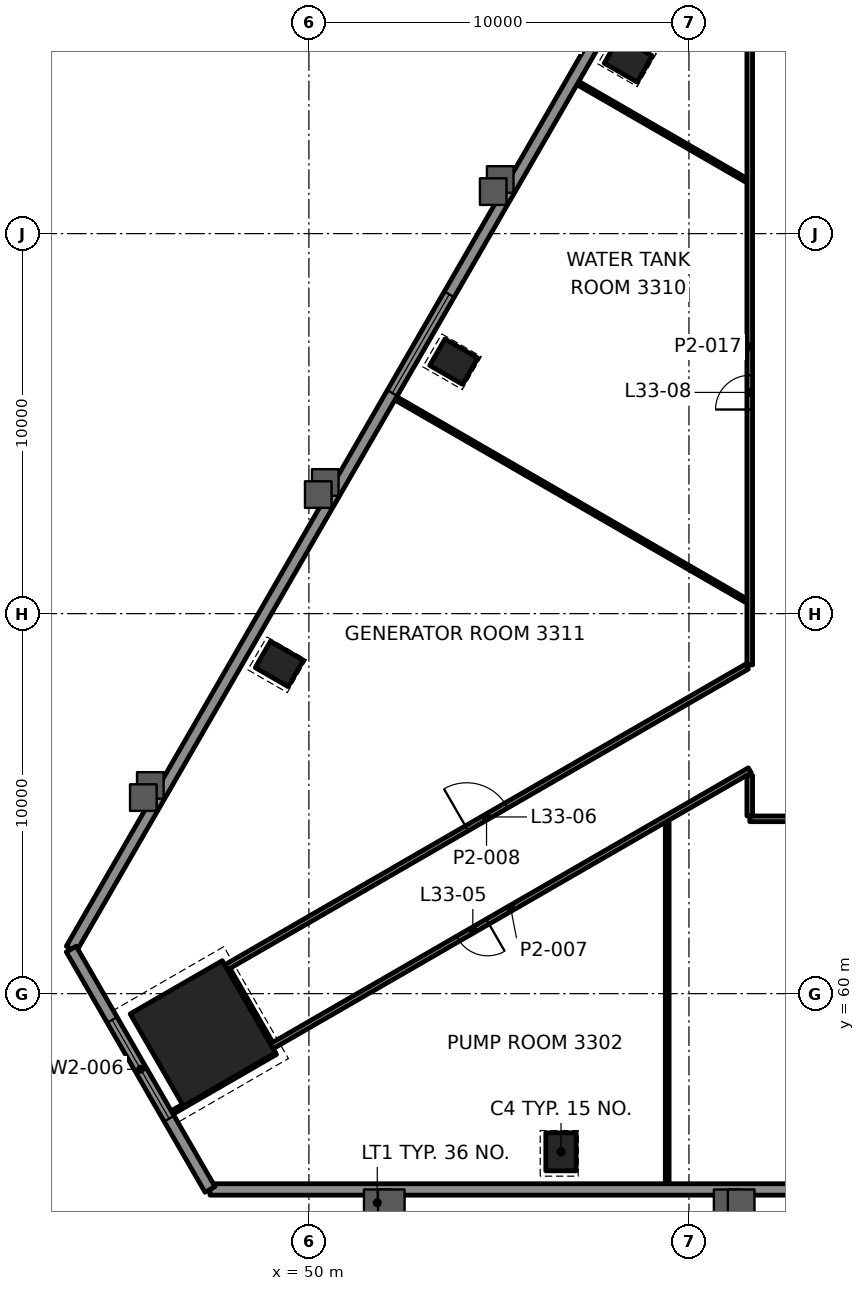
"""IFC4 building model, lengths in metres.
Left out: names, types, materials, properties, quantities, classifications, styles, units other than length and angle.
Written with IfcOpenShell. Run it as: python <this file> out.ifc"""

import sys

from ifc_helpers import new_model, si_unit, direction, frame, frame_2d, origin, origin_2d, place, context, subcontext, project, spatial, rectangle, hollow_rectangle, extrude, element, fill, save


model = new_model("IFC4")
c1 = context("Model", 3, precision=1e-05, world=origin(), true_north=direction((0.0, 1.0)))
c2 = subcontext(c1, "Body", "Model", "MODEL_VIEW")
j1 = project(units=[si_unit("LENGTHUNIT", "METRE"), si_unit("PLANEANGLEUNIT", "RADIAN")], contexts=[c1])
p1 = place(None, origin())
s1 = spatial("IfcSite", under=j1, at=p1, CompositionType="ELEMENT")
p2 = place(p1, origin())
s2 = spatial("IfcBuilding", under=s1, at=p2, CompositionType="ELEMENT")
p3 = place(p2, frame((0.0, 0.0, 146.8)))
s3 = spatial("IfcBuildingStorey", under=s2, at=p3, CompositionType="ELEMENT", Elevation=146.8)
p4 = place(p3, frame((47.209, 58.955, 0.0), z_axis=(0.0, 0.0, 1.0), x_axis=(0.5, -0.866025403784, 0.0)))
e1 = element("IfcColumn", 1, at=p4, inside=s3, PredefinedType="COLUMN", context=c2, shape_type="SweptSolid", body=[
    extrude(rectangle(XDim=2.8, YDim=2.8, at=origin_2d()), origin(), (0.0, 0.0, 1.0), 4.5),
])
for number, where, z_axis, x_axis in (
    (2, (56.633, 55.837, -0.0), (0.0, 0.0, 1.0), (1.0, 0.0, 0.0)),
    (3, (58.405, 84.582, -0.0), (0.0, 0.0, 1.0), (-0.5, -0.866, 0.0)),
    (4, (53.813, 76.628, -0.0), (0.0, 0.0, 1.0), (-0.5, -0.866, 0.0)),
    (5, (49.221, 68.676, -0.0), (0.0, 0.0, 1.0), (-0.5, -0.866, 0.0)),
):
    element("IfcColumn", number, at=place(p3, frame(where, z_axis=z_axis, x_axis=x_axis)), inside=s3, PredefinedType="COLUMN", context=c2, shape_type="SweptSolid", body=[
        extrude(hollow_rectangle(XDim=0.8, YDim=1.0, WallThickness=0.05, at=origin_2d()), origin(), (0.0, 0.0, 1.0), 4.5),
    ])
p5 = place(p3, frame((88.399, 64.6, 0.0), z_axis=(0.0, 0.0, 1.0), x_axis=(-1.0, 0.0, 0.0)))
e6 = element("IfcWall", 6, at=p5, inside=s3, PredefinedType="PARTITIONING", context=c2, shape_type="SweptSolid", body=[
    extrude(rectangle(XDim=26.799, YDim=0.15, at=frame_2d((13.399, 0.0))), origin(), (0.0, 0.0, 1.0), 3.45),
])
p6 = place(p5, frame((12.8, 0.0, 0.0)))
e7 = element("IfcOpeningElement", 7, at=p6, cuts=e6, PredefinedType="OPENING", context=c2, shape_type="SweptSolid", body=[
    extrude(rectangle(XDim=1.2, YDim=2.1, at=frame_2d((0.6, 1.05))), frame((0.0, 0.085, 0.0), z_axis=(0.0, -1.0, 0.0), x_axis=(1.0, 0.0, 0.0)), (0.0, 0.0, 1.0), 0.17),
])
p7 = place(p3, frame((46.3, 56.813, 0.0), z_axis=(0.0, 0.0, 1.0), x_axis=(0.866034567317, 0.49998412796, 0.0)))
e8 = element("IfcWall", 8, at=p7, inside=s3, PredefinedType="PARTITIONING", context=c2, shape_type="SweptSolid", body=[
    extrude(rectangle(XDim=3.257, YDim=0.1, at=frame_2d((1.629, 0.0))), origin(), (0.0, 0.0, 1.0), 3.45),
])
p8 = place(p3, frame((61.6, 65.878, 0.0), z_axis=(0.0, 0.0, 1.0), x_axis=(-0.866027154752, -0.499996967223, 0.0)))
e9 = element("IfcWall", 9, at=p8, inside=s3, PredefinedType="PARTITIONING", context=c2, shape_type="SweptSolid", body=[
    extrude(rectangle(XDim=14.524, YDim=0.15, at=frame_2d((7.262, 0.0))), origin(), (0.0, 0.0, 1.0), 3.297),
])
p9 = place(p8, frame((7.965, 0.0, 0.0)))
e10 = element("IfcOpeningElement", 10, at=p9, cuts=e9, PredefinedType="OPENING", context=c2, shape_type="SweptSolid", body=[
    extrude(rectangle(XDim=0.9, YDim=2.1, at=frame_2d((0.45, 1.05))), frame((0.0, 0.085, 0.0), z_axis=(0.0, -1.0, 0.0), x_axis=(1.0, 0.0, 0.0)), (0.0, 0.0, 1.0), 0.17),
])
p10 = place(p3, frame((47.822, 60.693, 0.0), z_axis=(0.0, 0.0, 1.0), x_axis=(0.866022169491, 0.500005601919, 0.0)))
e11 = element("IfcWall", 11, at=p10, inside=s3, PredefinedType="PARTITIONING", context=c2, shape_type="SweptSolid", body=[
    extrude(rectangle(XDim=15.823, YDim=0.15, at=frame_2d((7.912, 0.0))), origin(), (0.0, 0.0, 1.0), 3.45),
])
p11 = place(p10, frame((7.312, 0.0, 0.0)))
e12 = element("IfcOpeningElement", 12, at=p11, cuts=e11, PredefinedType="OPENING", context=c2, shape_type="SweptSolid", body=[
    extrude(rectangle(XDim=1.2, YDim=2.1, at=frame_2d((0.6, 1.05))), frame((0.0, 0.085, 0.0), z_axis=(0.0, -1.0, 0.0), x_axis=(1.0, 0.0, 0.0)), (0.0, 0.0, 1.0), 0.17),
])
p12 = place(p3, frame((61.6, 64.676, 0.0), z_axis=(0.0, 0.0, 1.0), x_axis=(0.0, 1.0, 0.0)))
e13 = element("IfcWall", 13, at=p12, inside=s3, PredefinedType="PARTITIONING", context=c2, shape_type="SweptSolid", body=[
    extrude(rectangle(XDim=1.066, YDim=0.15, at=frame_2d((0.533, 0.0))), origin(), (0.0, 0.0, 1.0), 3.297),
])
p13 = place(p3, frame((61.6, 68.649, 0.0), z_axis=(0.0, 0.0, 1.0), x_axis=(0.0, 1.0, 0.0)))
e14 = element("IfcWall", 14, at=p13, inside=s3, PredefinedType="PARTITIONING", context=c2, shape_type="SweptSolid", body=[
    extrude(rectangle(XDim=16.75, YDim=0.15, at=frame_2d((8.375, 0.0))), origin(), (0.0, 0.0, 1.0), 3.45),
])
p14 = place(p13, frame((6.722, 0.0, 0.0)))
e15 = element("IfcOpeningElement", 15, at=p14, cuts=e14, PredefinedType="OPENING", context=c2, shape_type="SweptSolid", body=[
    extrude(rectangle(XDim=0.9, YDim=2.1, at=frame_2d((0.45, 1.05))), frame((0.0, 0.085, 0.0), z_axis=(0.0, -1.0, 0.0), x_axis=(1.0, 0.0, 0.0)), (0.0, 0.0, 1.0), 0.17),
])
p15 = place(p3, frame((59.428, 54.877, 0.0), z_axis=(0.0, 0.0, 1.0), x_axis=(0.0, 1.0, 0.0)))
e16 = element("IfcWall", 16, at=p15, inside=s3, PredefinedType="PARTITIONING", context=c2, shape_type="SweptSolid", body=[
    extrude(rectangle(XDim=9.63, YDim=0.1, at=frame_2d((4.815, 0.0))), origin(), (0.0, 0.0, 1.0), 3.215),
])
p16 = place(p3, frame((48.981, 58.685, 0.0), z_axis=(0.0, 0.0, 1.0), x_axis=(-0.500006267848, 0.866021785011, 0.0)))
e17 = element("IfcWall", 17, at=p16, inside=s3, PredefinedType="PARTITIONING", context=c2, shape_type="SweptSolid", body=[
    extrude(rectangle(XDim=2.234, YDim=0.15, at=frame_2d((1.117, 0.0))), origin(), (0.0, 0.0, 1.0), 3.297),
])
p17 = place(p3, frame((61.498, 81.41, 0.0), z_axis=(0.0, 0.0, 1.0), x_axis=(-0.866017510603, 0.500013671143, 0.0)))
e18 = element("IfcWall", 18, at=p17, inside=s3, PredefinedType="PARTITIONING", context=c2, shape_type="SweptSolid", body=[
    extrude(rectangle(XDim=5.225, YDim=0.1, at=frame_2d((2.612, 0.0))), origin(), (0.0, 0.0, 1.0), 3.215),
])
p18 = place(p3, frame((61.499, 70.346, 0.0), z_axis=(0.0, 0.0, 1.0), x_axis=(-0.866026474193, 0.499998145993, 0.0)))
e19 = element("IfcWall", 19, at=p18, inside=s3, PredefinedType="PARTITIONING", context=c2, shape_type="SweptSolid", body=[
    extrude(rectangle(XDim=10.757, YDim=0.1, at=frame_2d((5.379, 0.0))), origin(), (0.0, 0.0, 1.0), 3.215),
])
p19 = place(p3, frame((47.398, 54.847, 0.0), z_axis=(0.0, 0.0, 1.0), x_axis=(1.0, 0.0, 0.0)))
e20 = element("IfcWall", 20, at=p19, inside=s3, PredefinedType="SOLIDWALL", context=c2, shape_type="SweptSolid", body=[
    extrude(rectangle(XDim=55.204, YDim=0.3, at=frame_2d((27.602, 0.0))), origin(), (0.0, 0.0, 1.0), 4.05),
])
p20 = place(p19, frame((16.895, 0.0, 0.8)))
e21 = element("IfcOpeningElement", 21, at=p20, cuts=e20, PredefinedType="OPENING", context=c2, shape_type="SweptSolid", body=[
    extrude(rectangle(XDim=3.0, YDim=2.4, at=frame_2d((1.5, 1.2))), frame((0.0, 0.16, 0.0), z_axis=(0.0, -1.0, 0.0), x_axis=(1.0, 0.0, 0.0)), (0.0, 0.0, 1.0), 0.32),
])
p21 = place(p19, frame((35.309, 0.0, 0.8)))
e22 = element("IfcOpeningElement", 22, at=p21, cuts=e20, PredefinedType="OPENING", context=c2, shape_type="SweptSolid", body=[
    extrude(rectangle(XDim=3.0, YDim=2.4, at=frame_2d((1.5, 1.2))), frame((0.0, 0.16, 0.0), z_axis=(0.0, -1.0, 0.0), x_axis=(1.0, 0.0, 0.0)), (0.0, 0.0, 1.0), 0.32),
])
p22 = place(p3, frame((71.348, 108.98, 0.0), z_axis=(0.0, 0.0, 1.0), x_axis=(-0.500000383388, -0.866025182435, 0.0)))
e23 = element("IfcWall", 23, at=p22, inside=s3, PredefinedType="SOLIDWALL", context=c2, shape_type="SweptSolid", body=[
    extrude(rectangle(XDim=55.204, YDim=0.3, at=frame_2d((27.602, 0.0))), origin(), (0.0, 0.0, 1.0), 4.05),
])
p23 = place(p22, frame((16.895, 0.0, 0.8)))
e24 = element("IfcOpeningElement", 24, at=p23, cuts=e23, PredefinedType="OPENING", context=c2, shape_type="SweptSolid", body=[
    extrude(rectangle(XDim=3.0, YDim=2.4, at=frame_2d((1.5, 1.2))), frame((0.0, 0.16, 0.0), z_axis=(0.0, -1.0, 0.0), x_axis=(1.0, 0.0, 0.0)), (0.0, 0.0, 1.0), 0.32),
])
p24 = place(p22, frame((35.309, 0.0, 0.8)))
e25 = element("IfcOpeningElement", 25, at=p24, cuts=e23, PredefinedType="OPENING", context=c2, shape_type="SweptSolid", body=[
    extrude(rectangle(XDim=3.0, YDim=2.4, at=frame_2d((1.5, 1.2))), frame((0.0, 0.16, 0.0), z_axis=(0.0, -1.0, 0.0), x_axis=(1.0, 0.0, 0.0)), (0.0, 0.0, 1.0), 0.32),
])
p25 = place(p3, frame((43.746, 61.172, 0.0), z_axis=(0.0, 0.0, 1.0), x_axis=(0.500000231294, -0.866025270247, 0.0)))
e26 = element("IfcWall", 26, at=p25, inside=s3, PredefinedType="SOLIDWALL", context=c2, shape_type="SweptSolid", body=[
    extrude(rectangle(XDim=7.304, YDim=0.3, at=frame_2d((3.652, 0.0))), origin(), (0.0, 0.0, 1.0), 4.05),
])
p26 = place(p25, frame((2.152, 0.0, 0.8)))
e27 = element("IfcOpeningElement", 27, at=p26, cuts=e26, PredefinedType="OPENING", context=c2, shape_type="SweptSolid", body=[
    extrude(rectangle(XDim=3.0, YDim=2.4, at=frame_2d((1.5, 1.2))), frame((0.0, 0.16, 0.0), z_axis=(0.0, -1.0, 0.0), x_axis=(1.0, 0.0, 0.0)), (0.0, 0.0, 1.0), 0.32),
])
p27 = place(p9, origin())
e28 = element("IfcDoor", 28, at=p27, inside=s3, OperationType="SINGLE_SWING_RIGHT", PredefinedType="DOOR", context=c2, shape_type="SweptSolid", body=[
    extrude(rectangle(XDim=0.9, YDim=2.1, at=frame_2d((0.45, 1.05))), frame((0.0, 0.025, 0.0), z_axis=(0.0, -1.0, 0.0), x_axis=(1.0, 0.0, 0.0)), (0.0, 0.0, 1.0), 0.05),
])
fill(e10, e28)
p28 = place(p11, origin())
e29 = element("IfcDoor", 29, at=p28, inside=s3, OperationType="DOUBLE_DOOR_SINGLE_SWING", PredefinedType="DOOR", context=c2, shape_type="SweptSolid", body=[
    extrude(rectangle(XDim=1.2, YDim=2.1, at=frame_2d((0.6, 1.05))), frame((0.0, 0.025, 0.0), z_axis=(0.0, -1.0, 0.0), x_axis=(1.0, 0.0, 0.0)), (0.0, 0.0, 1.0), 0.05),
])
fill(e12, e29)
p29 = place(p14, origin())
e30 = element("IfcDoor", 30, at=p29, inside=s3, OperationType="SINGLE_SWING_LEFT", PredefinedType="DOOR", context=c2, shape_type="SweptSolid", body=[
    extrude(rectangle(XDim=0.9, YDim=2.1, at=frame_2d((0.45, 1.05))), frame((0.0, 0.025, 0.0), z_axis=(0.0, -1.0, 0.0), x_axis=(1.0, 0.0, 0.0)), (0.0, 0.0, 1.0), 0.05),
])
fill(e15, e30)
p30 = place(p24, origin())
e31 = element("IfcWindow", 31, at=p30, inside=s3, PartitioningType="SINGLE_PANEL", PredefinedType="WINDOW", context=c2, shape_type="SweptSolid", body=[
    extrude(rectangle(XDim=3.0, YDim=2.4, at=frame_2d((1.5, 1.2))), frame((0.0, 0.03, 0.0), z_axis=(0.0, -1.0, 0.0), x_axis=(1.0, 0.0, 0.0)), (0.0, 0.0, 1.0), 0.06),
])
fill(e25, e31)
p31 = place(p26, origin())
e32 = element("IfcWindow", 32, at=p31, inside=s3, PartitioningType="SINGLE_PANEL", PredefinedType="WINDOW", context=c2, shape_type="SweptSolid", body=[
    extrude(rectangle(XDim=3.0, YDim=2.4, at=frame_2d((1.5, 1.2))), frame((0.0, 0.03, 0.0), z_axis=(0.0, -1.0, 0.0), x_axis=(1.0, 0.0, 0.0)), (0.0, 0.0, 1.0), 0.06),
])
fill(e27, e32)
save(model, sys.argv[1])
